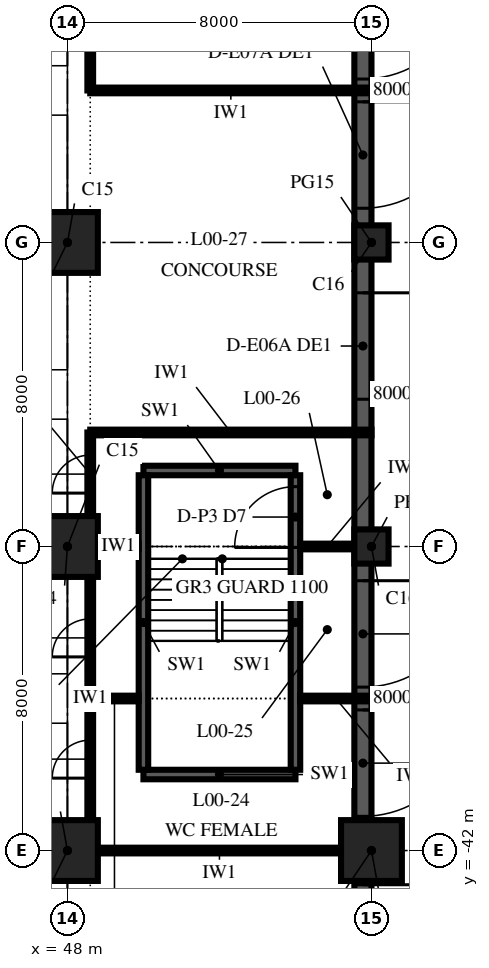
"""IFC4 building model, lengths in metres.
Left out: names, types, materials, properties, quantities, classifications, styles, units other than length and angle.
Written with IfcOpenShell. Run it as: python <this file> out.ifc"""

import sys

from ifc_helpers import new_model, si_unit, direction, frame, frame_2d, origin, origin_2d, place, context, subcontext, project, spatial, rectangle, extrude, element, fill, save


model = new_model("IFC4")
c1 = context("Model", 3, precision=1e-05, world=origin(), true_north=direction((0.0, 1.0)))
c2 = subcontext(c1, "Body", "Model", "MODEL_VIEW")
j1 = project(units=[si_unit("LENGTHUNIT", "METRE"), si_unit("PLANEANGLEUNIT", "RADIAN")], contexts=[c1])
p1 = place(None, origin())
s1 = spatial("IfcSite", under=j1, at=p1, CompositionType="ELEMENT")
p2 = place(p1, origin())
s2 = spatial("IfcBuilding", under=s1, at=p2, CompositionType="ELEMENT")
p3 = place(p2, origin())
s3 = spatial("IfcBuildingStorey", under=s2, at=p3, CompositionType="ELEMENT", Elevation=0.0)
for number, where, z_axis, x_axis in (
    (1, (48.0, -42.0, 0.0), (0.0, 0.0, 1.0), (1.0, 0.0, 0.0)),
    (2, (48.0, -34.0, 0.0), (0.0, 0.0, 1.0), (1.0, 0.0, 0.0)),
    (3, (48.0, -26.0, 0.0), (0.0, 0.0, 1.0), (1.0, 0.0, 0.0)),
    (4, (56.0, -42.0, 0.0), (0.0, 0.0, 1.0), (1.0, 0.0, 0.0)),
):
    element("IfcColumn", number, at=place(p3, frame(where, z_axis=z_axis, x_axis=x_axis)), inside=s3, PredefinedType="COLUMN", context=c2, shape_type="SweptSolid", body=[
        extrude(rectangle(XDim=1.6, YDim=1.6, at=origin_2d()), origin(), (0.0, 0.0, 1.0), 6.0),
    ])
for number, where, z_axis, x_axis in (
    (5, (56.0, -34.0, 0.0), (0.0, 0.0, 1.0), (1.0, 0.0, 0.0)),
    (6, (56.0, -26.0, 0.0), (0.0, 0.0, 1.0), (1.0, 0.0, 0.0)),
):
    element("IfcColumn", number, at=place(p3, frame(where, z_axis=z_axis, x_axis=x_axis)), inside=s3, PredefinedType="COLUMN", context=c2, shape_type="SweptSolid", body=[
        extrude(rectangle(XDim=0.9, YDim=0.9, at=origin_2d()), origin(), (0.0, 0.0, 1.0), 6.0),
    ])
p4 = place(p3, frame((55.775, -73.55, 0.0), z_axis=(0.0, 0.0, 1.0), x_axis=(0.0, 1.0, 0.0)))
e7 = element("IfcWall", 7, at=p4, inside=s3, PredefinedType="SOLIDWALL", context=c2, shape_type="SweptSolid", body=[
    extrude(rectangle(XDim=119.1, YDim=0.45, at=frame_2d((59.55, 0.0))), origin(), (0.0, 0.0, 1.0), 6.0),
])
p5 = place(p4, frame((0.675, 0.0, 0.0)))
e8 = element("IfcOpeningElement", 8, at=p5, cuts=e7, PredefinedType="OPENING", context=c2, shape_type="SweptSolid", body=[
    extrude(rectangle(XDim=2.8, YDim=2.4, at=frame_2d((1.4, 1.2))), frame((0.0, 0.24, 0.0), z_axis=(0.0, -1.0, 0.0), x_axis=(1.0, 0.0, 0.0)), (0.0, 0.0, 1.0), 0.48),
])
p6 = place(p4, frame((4.075, 0.0, 0.0)))
e9 = element("IfcOpeningElement", 9, at=p6, cuts=e7, PredefinedType="OPENING", context=c2, shape_type="SweptSolid", body=[
    extrude(rectangle(XDim=2.8, YDim=2.4, at=frame_2d((1.4, 1.2))), frame((0.0, 0.24, 0.0), z_axis=(0.0, -1.0, 0.0), x_axis=(1.0, 0.0, 0.0)), (0.0, 0.0, 1.0), 0.48),
])
p7 = place(p4, frame((8.45, 0.0, 0.0)))
e10 = element("IfcOpeningElement", 10, at=p7, cuts=e7, PredefinedType="OPENING", context=c2, shape_type="SweptSolid", body=[
    extrude(rectangle(XDim=2.8, YDim=2.4, at=frame_2d((1.4, 1.2))), frame((0.0, 0.24, 0.0), z_axis=(0.0, -1.0, 0.0), x_axis=(1.0, 0.0, 0.0)), (0.0, 0.0, 1.0), 0.48),
])
p8 = place(p4, frame((11.85, 0.0, 0.0)))
e11 = element("IfcOpeningElement", 11, at=p8, cuts=e7, PredefinedType="OPENING", context=c2, shape_type="SweptSolid", body=[
    extrude(rectangle(XDim=2.8, YDim=2.4, at=frame_2d((1.4, 1.2))), frame((0.0, 0.24, 0.0), z_axis=(0.0, -1.0, 0.0), x_axis=(1.0, 0.0, 0.0)), (0.0, 0.0, 1.0), 0.48),
])
p9 = place(p4, frame((16.45, 0.0, 0.0)))
e12 = element("IfcOpeningElement", 12, at=p9, cuts=e7, PredefinedType="OPENING", context=c2, shape_type="SweptSolid", body=[
    extrude(rectangle(XDim=2.8, YDim=2.4, at=frame_2d((1.4, 1.2))), frame((0.0, 0.24, 0.0), z_axis=(0.0, -1.0, 0.0), x_axis=(1.0, 0.0, 0.0)), (0.0, 0.0, 1.0), 0.48),
])
p10 = place(p4, frame((19.85, 0.0, 0.0)))
e13 = element("IfcOpeningElement", 13, at=p10, cuts=e7, PredefinedType="OPENING", context=c2, shape_type="SweptSolid", body=[
    extrude(rectangle(XDim=2.8, YDim=2.4, at=frame_2d((1.4, 1.2))), frame((0.0, 0.24, 0.0), z_axis=(0.0, -1.0, 0.0), x_axis=(1.0, 0.0, 0.0)), (0.0, 0.0, 1.0), 0.48),
])
p11 = place(p4, frame((24.45, 0.0, 0.0)))
e14 = element("IfcOpeningElement", 14, at=p11, cuts=e7, PredefinedType="OPENING", context=c2, shape_type="SweptSolid", body=[
    extrude(rectangle(XDim=2.8, YDim=2.4, at=frame_2d((1.4, 1.2))), frame((0.0, 0.24, 0.0), z_axis=(0.0, -1.0, 0.0), x_axis=(1.0, 0.0, 0.0)), (0.0, 0.0, 1.0), 0.48),
])
p12 = place(p4, frame((27.85, 0.0, 0.0)))
e15 = element("IfcOpeningElement", 15, at=p12, cuts=e7, PredefinedType="OPENING", context=c2, shape_type="SweptSolid", body=[
    extrude(rectangle(XDim=2.8, YDim=2.4, at=frame_2d((1.4, 1.2))), frame((0.0, 0.24, 0.0), z_axis=(0.0, -1.0, 0.0), x_axis=(1.0, 0.0, 0.0)), (0.0, 0.0, 1.0), 0.48),
])
p13 = place(p4, frame((32.45, 0.0, 0.0)))
e16 = element("IfcOpeningElement", 16, at=p13, cuts=e7, PredefinedType="OPENING", context=c2, shape_type="SweptSolid", body=[
    extrude(rectangle(XDim=2.8, YDim=2.4, at=frame_2d((1.4, 1.2))), frame((0.0, 0.24, 0.0), z_axis=(0.0, -1.0, 0.0), x_axis=(1.0, 0.0, 0.0)), (0.0, 0.0, 1.0), 0.48),
])
p14 = place(p4, frame((35.85, 0.0, 0.0)))
e17 = element("IfcOpeningElement", 17, at=p14, cuts=e7, PredefinedType="OPENING", context=c2, shape_type="SweptSolid", body=[
    extrude(rectangle(XDim=2.8, YDim=2.4, at=frame_2d((1.4, 1.2))), frame((0.0, 0.24, 0.0), z_axis=(0.0, -1.0, 0.0), x_axis=(1.0, 0.0, 0.0)), (0.0, 0.0, 1.0), 0.48),
])
p15 = place(p4, frame((43.425, 0.0, 0.0)))
e18 = element("IfcOpeningElement", 18, at=p15, cuts=e7, PredefinedType="OPENING", context=c2, shape_type="SweptSolid", body=[
    extrude(rectangle(XDim=2.8, YDim=2.4, at=frame_2d((1.4, 1.2))), frame((0.0, 0.24, 0.0), z_axis=(0.0, -1.0, 0.0), x_axis=(1.0, 0.0, 0.0)), (0.0, 0.0, 1.0), 0.48),
])
p16 = place(p4, frame((48.45, 0.0, 0.0)))
e19 = element("IfcOpeningElement", 19, at=p16, cuts=e7, PredefinedType="OPENING", context=c2, shape_type="SweptSolid", body=[
    extrude(rectangle(XDim=2.8, YDim=2.4, at=frame_2d((1.4, 1.2))), frame((0.0, 0.24, 0.0), z_axis=(0.0, -1.0, 0.0), x_axis=(1.0, 0.0, 0.0)), (0.0, 0.0, 1.0), 0.48),
])
p17 = place(p4, frame((51.85, 0.0, 0.0)))
e20 = element("IfcOpeningElement", 20, at=p17, cuts=e7, PredefinedType="OPENING", context=c2, shape_type="SweptSolid", body=[
    extrude(rectangle(XDim=2.8, YDim=2.4, at=frame_2d((1.4, 1.2))), frame((0.0, 0.24, 0.0), z_axis=(0.0, -1.0, 0.0), x_axis=(1.0, 0.0, 0.0)), (0.0, 0.0, 1.0), 0.48),
])
p18 = place(p4, frame((56.45, 0.0, 0.0)))
e21 = element("IfcOpeningElement", 21, at=p18, cuts=e7, PredefinedType="OPENING", context=c2, shape_type="SweptSolid", body=[
    extrude(rectangle(XDim=2.8, YDim=2.4, at=frame_2d((1.4, 1.2))), frame((0.0, 0.24, 0.0), z_axis=(0.0, -1.0, 0.0), x_axis=(1.0, 0.0, 0.0)), (0.0, 0.0, 1.0), 0.48),
])
p19 = place(p4, frame((59.85, 0.0, 0.0)))
e22 = element("IfcOpeningElement", 22, at=p19, cuts=e7, PredefinedType="OPENING", context=c2, shape_type="SweptSolid", body=[
    extrude(rectangle(XDim=2.8, YDim=2.4, at=frame_2d((1.4, 1.2))), frame((0.0, 0.24, 0.0), z_axis=(0.0, -1.0, 0.0), x_axis=(1.0, 0.0, 0.0)), (0.0, 0.0, 1.0), 0.48),
])
p20 = place(p4, frame((64.45, 0.0, 0.0)))
e23 = element("IfcOpeningElement", 23, at=p20, cuts=e7, PredefinedType="OPENING", context=c2, shape_type="SweptSolid", body=[
    extrude(rectangle(XDim=2.8, YDim=2.4, at=frame_2d((1.4, 1.2))), frame((0.0, 0.24, 0.0), z_axis=(0.0, -1.0, 0.0), x_axis=(1.0, 0.0, 0.0)), (0.0, 0.0, 1.0), 0.48),
])
p21 = place(p4, frame((67.85, 0.0, 0.0)))
e24 = element("IfcOpeningElement", 24, at=p21, cuts=e7, PredefinedType="OPENING", context=c2, shape_type="SweptSolid", body=[
    extrude(rectangle(XDim=2.8, YDim=2.4, at=frame_2d((1.4, 1.2))), frame((0.0, 0.24, 0.0), z_axis=(0.0, -1.0, 0.0), x_axis=(1.0, 0.0, 0.0)), (0.0, 0.0, 1.0), 0.48),
])
p22 = place(p4, frame((72.45, 0.0, 0.0)))
e25 = element("IfcOpeningElement", 25, at=p22, cuts=e7, PredefinedType="OPENING", context=c2, shape_type="SweptSolid", body=[
    extrude(rectangle(XDim=2.8, YDim=2.4, at=frame_2d((1.4, 1.2))), frame((0.0, 0.24, 0.0), z_axis=(0.0, -1.0, 0.0), x_axis=(1.0, 0.0, 0.0)), (0.0, 0.0, 1.0), 0.48),
])
p23 = place(p4, frame((75.85, 0.0, 0.0)))
e26 = element("IfcOpeningElement", 26, at=p23, cuts=e7, PredefinedType="OPENING", context=c2, shape_type="SweptSolid", body=[
    extrude(rectangle(XDim=2.8, YDim=2.4, at=frame_2d((1.4, 1.2))), frame((0.0, 0.24, 0.0), z_axis=(0.0, -1.0, 0.0), x_axis=(1.0, 0.0, 0.0)), (0.0, 0.0, 1.0), 0.48),
])
p24 = place(p4, frame((80.45, 0.0, 0.0)))
e27 = element("IfcOpeningElement", 27, at=p24, cuts=e7, PredefinedType="OPENING", context=c2, shape_type="SweptSolid", body=[
    extrude(rectangle(XDim=2.8, YDim=2.4, at=frame_2d((1.4, 1.2))), frame((0.0, 0.24, 0.0), z_axis=(0.0, -1.0, 0.0), x_axis=(1.0, 0.0, 0.0)), (0.0, 0.0, 1.0), 0.48),
])
p25 = place(p4, frame((83.85, 0.0, 0.0)))
e28 = element("IfcOpeningElement", 28, at=p25, cuts=e7, PredefinedType="OPENING", context=c2, shape_type="SweptSolid", body=[
    extrude(rectangle(XDim=2.8, YDim=2.4, at=frame_2d((1.4, 1.2))), frame((0.0, 0.24, 0.0), z_axis=(0.0, -1.0, 0.0), x_axis=(1.0, 0.0, 0.0)), (0.0, 0.0, 1.0), 0.48),
])
p26 = place(p4, frame((88.45, 0.0, 0.0)))
e29 = element("IfcOpeningElement", 29, at=p26, cuts=e7, PredefinedType="OPENING", context=c2, shape_type="SweptSolid", body=[
    extrude(rectangle(XDim=2.8, YDim=2.4, at=frame_2d((1.4, 1.2))), frame((0.0, 0.24, 0.0), z_axis=(0.0, -1.0, 0.0), x_axis=(1.0, 0.0, 0.0)), (0.0, 0.0, 1.0), 0.48),
])
p27 = place(p4, frame((91.85, 0.0, 0.0)))
e30 = element("IfcOpeningElement", 30, at=p27, cuts=e7, PredefinedType="OPENING", context=c2, shape_type="SweptSolid", body=[
    extrude(rectangle(XDim=2.8, YDim=2.4, at=frame_2d((1.4, 1.2))), frame((0.0, 0.24, 0.0), z_axis=(0.0, -1.0, 0.0), x_axis=(1.0, 0.0, 0.0)), (0.0, 0.0, 1.0), 0.48),
])
p28 = place(p4, frame((96.45, 0.0, 0.0)))
e31 = element("IfcOpeningElement", 31, at=p28, cuts=e7, PredefinedType="OPENING", context=c2, shape_type="SweptSolid", body=[
    extrude(rectangle(XDim=2.8, YDim=2.4, at=frame_2d((1.4, 1.2))), frame((0.0, 0.24, 0.0), z_axis=(0.0, -1.0, 0.0), x_axis=(1.0, 0.0, 0.0)), (0.0, 0.0, 1.0), 0.48),
])
p29 = place(p4, frame((99.85, 0.0, 0.0)))
e32 = element("IfcOpeningElement", 32, at=p29, cuts=e7, PredefinedType="OPENING", context=c2, shape_type="SweptSolid", body=[
    extrude(rectangle(XDim=2.8, YDim=2.4, at=frame_2d((1.4, 1.2))), frame((0.0, 0.24, 0.0), z_axis=(0.0, -1.0, 0.0), x_axis=(1.0, 0.0, 0.0)), (0.0, 0.0, 1.0), 0.48),
])
p30 = place(p4, frame((104.45, 0.0, 0.0)))
e33 = element("IfcOpeningElement", 33, at=p30, cuts=e7, PredefinedType="OPENING", context=c2, shape_type="SweptSolid", body=[
    extrude(rectangle(XDim=2.8, YDim=2.4, at=frame_2d((1.4, 1.2))), frame((0.0, 0.24, 0.0), z_axis=(0.0, -1.0, 0.0), x_axis=(1.0, 0.0, 0.0)), (0.0, 0.0, 1.0), 0.48),
])
p31 = place(p4, frame((107.85, 0.0, 0.0)))
e34 = element("IfcOpeningElement", 34, at=p31, cuts=e7, PredefinedType="OPENING", context=c2, shape_type="SweptSolid", body=[
    extrude(rectangle(XDim=2.8, YDim=2.4, at=frame_2d((1.4, 1.2))), frame((0.0, 0.24, 0.0), z_axis=(0.0, -1.0, 0.0), x_axis=(1.0, 0.0, 0.0)), (0.0, 0.0, 1.0), 0.48),
])
p32 = place(p4, frame((112.225, 0.0, 0.0)))
e35 = element("IfcOpeningElement", 35, at=p32, cuts=e7, PredefinedType="OPENING", context=c2, shape_type="SweptSolid", body=[
    extrude(rectangle(XDim=2.8, YDim=2.4, at=frame_2d((1.4, 1.2))), frame((0.0, 0.24, 0.0), z_axis=(0.0, -1.0, 0.0), x_axis=(1.0, 0.0, 0.0)), (0.0, 0.0, 1.0), 0.48),
])
p33 = place(p4, frame((115.625, 0.0, 0.0)))
e36 = element("IfcOpeningElement", 36, at=p33, cuts=e7, PredefinedType="OPENING", context=c2, shape_type="SweptSolid", body=[
    extrude(rectangle(XDim=2.8, YDim=2.4, at=frame_2d((1.4, 1.2))), frame((0.0, 0.24, 0.0), z_axis=(0.0, -1.0, 0.0), x_axis=(1.0, 0.0, 0.0)), (0.0, 0.0, 1.0), 0.48),
])
for number, where, z_axis, x_axis in (
    (37, (50.0, -40.0, 0.0), (0.0, 0.0, 1.0), (1.0, 0.0, 0.0)),
    (38, (54.0, -32.0, 0.0), (0.0, 0.0, 1.0), (-1.0, 0.0, 0.0)),
):
    element("IfcWall", number, at=place(p3, frame(where, z_axis=z_axis, x_axis=x_axis)), inside=s3, PredefinedType="SOLIDWALL", context=c2, shape_type="SweptSolid", body=[
        extrude(rectangle(XDim=4.0, YDim=0.25, at=frame_2d((2.0, 0.0))), origin(), (0.0, 0.0, 1.0), 6.0),
    ])
p34 = place(p3, frame((54.0, -39.875, 0.0), z_axis=(0.0, 0.0, 1.0), x_axis=(0.0, 1.0, 0.0)))
e39 = element("IfcWall", 39, at=p34, inside=s3, PredefinedType="SOLIDWALL", context=c2, shape_type="SweptSolid", body=[
    extrude(rectangle(XDim=7.75, YDim=0.25, at=frame_2d((3.875, 0.0))), origin(), (0.0, 0.0, 1.0), 6.0),
])
p35 = place(p34, frame((5.85, 0.0, 0.0)))
e40 = element("IfcOpeningElement", 40, at=p35, cuts=e39, PredefinedType="OPENING", context=c2, shape_type="SweptSolid", body=[
    extrude(rectangle(XDim=1.6, YDim=2.1, at=frame_2d((0.8, 1.05))), frame((0.0, 0.14, 0.0), z_axis=(0.0, -1.0, 0.0), x_axis=(1.0, 0.0, 0.0)), (0.0, 0.0, 1.0), 0.28),
])
p36 = place(p3, frame((50.0, -32.125, 0.0), z_axis=(0.0, 0.0, 1.0), x_axis=(0.0, -1.0, 0.0)))
e41 = element("IfcWall", 41, at=p36, inside=s3, PredefinedType="SOLIDWALL", context=c2, shape_type="SweptSolid", body=[
    extrude(rectangle(XDim=7.75, YDim=0.25, at=frame_2d((3.875, 0.0))), origin(), (0.0, 0.0, 1.0), 6.0),
])
p37 = place(p3, frame((48.6, -41.19, 0.0), z_axis=(0.0, 0.0, 1.0), x_axis=(0.0, 1.0, 0.0)))
e42 = element("IfcWall", 42, at=p37, inside=s3, PredefinedType="PARTITIONING", context=c2, shape_type="SweptSolid", body=[
    extrude(rectangle(XDim=6.38, YDim=0.15, at=frame_2d((3.19, 0.0))), origin(), (0.0, 0.0, 1.0), 4.1),
])
p38 = place(p37, frame((1.095, 0.0, 0.0)))
e43 = element("IfcOpeningElement", 43, at=p38, cuts=e42, PredefinedType="OPENING", context=c2, shape_type="SweptSolid", body=[
    extrude(rectangle(XDim=1.0, YDim=2.1, at=frame_2d((0.5, 1.05))), frame((0.0, 0.09, 0.0), z_axis=(0.0, -1.0, 0.0), x_axis=(1.0, 0.0, 0.0)), (0.0, 0.0, 1.0), 0.18),
])
p39 = place(p37, frame((4.285, 0.0, 0.0)))
e44 = element("IfcOpeningElement", 44, at=p39, cuts=e42, PredefinedType="OPENING", context=c2, shape_type="SweptSolid", body=[
    extrude(rectangle(XDim=1.0, YDim=2.1, at=frame_2d((0.5, 1.05))), frame((0.0, 0.09, 0.0), z_axis=(0.0, -1.0, 0.0), x_axis=(1.0, 0.0, 0.0)), (0.0, 0.0, 1.0), 0.18),
])
p40 = place(p3, frame((48.6, -33.19, 0.0), z_axis=(0.0, 0.0, 1.0), x_axis=(0.0, 1.0, 0.0)))
e45 = element("IfcWall", 45, at=p40, inside=s3, PredefinedType="PARTITIONING", context=c2, shape_type="SweptSolid", body=[
    extrude(rectangle(XDim=2.19, YDim=0.15, at=frame_2d((1.095, 0.0))), origin(), (0.0, 0.0, 1.0), 5.05),
])
p41 = place(p40, frame((0.595, 0.0, 0.0)))
e46 = element("IfcOpeningElement", 46, at=p41, cuts=e45, PredefinedType="OPENING", context=c2, shape_type="SweptSolid", body=[
    extrude(rectangle(XDim=1.0, YDim=2.1, at=frame_2d((0.5, 1.05))), frame((0.0, 0.09, 0.0), z_axis=(0.0, -1.0, 0.0), x_axis=(1.0, 0.0, 0.0)), (0.0, 0.0, 1.0), 0.18),
])
p42 = place(p3, frame((48.6, -22.0, 0.0), z_axis=(0.0, 0.0, 1.0), x_axis=(0.0, 1.0, 0.0)))
e47 = element("IfcWall", 47, at=p42, inside=s3, PredefinedType="PARTITIONING", context=c2, shape_type="SweptSolid", body=[
    extrude(rectangle(XDim=3.715, YDim=0.15, at=frame_2d((1.857, 0.0))), origin(), (0.0, 0.0, 1.0), 5.7),
])
p43 = place(p42, frame((1.357, 0.0, 0.0)))
e48 = element("IfcOpeningElement", 48, at=p43, cuts=e47, PredefinedType="OPENING", context=c2, shape_type="SweptSolid", body=[
    extrude(rectangle(XDim=1.0, YDim=2.1, at=frame_2d((0.5, 1.05))), frame((0.0, 0.09, 0.0), z_axis=(0.0, -1.0, 0.0), x_axis=(1.0, 0.0, 0.0)), (0.0, 0.0, 1.0), 0.18),
])
p44 = place(p3, frame((48.81, -42.0, 0.0), z_axis=(0.0, 0.0, 1.0), x_axis=(1.0, 0.0, 0.0)))
e49 = element("IfcWall", 49, at=p44, inside=s3, PredefinedType="PARTITIONING", context=c2, shape_type="SweptSolid", body=[
    extrude(rectangle(XDim=6.38, YDim=0.15, at=frame_2d((3.19, 0.0))), origin(), (0.0, 0.0, 1.0), 4.1),
])
p45 = place(p3, frame((48.6, -38.0, 0.0), z_axis=(0.0, 0.0, 1.0), x_axis=(1.0, 0.0, 0.0)))
e50 = element("IfcWall", 50, at=p45, inside=s3, PredefinedType="PARTITIONING", context=c2, shape_type="SweptSolid", body=[
    extrude(rectangle(XDim=1.275, YDim=0.15, at=frame_2d((0.637, 0.0))), origin(), (0.0, 0.0, 1.0), 5.7),
])
p46 = place(p3, frame((54.125, -38.0, 0.0), z_axis=(0.0, 0.0, 1.0), x_axis=(1.0, 0.0, 0.0)))
e51 = element("IfcWall", 51, at=p46, inside=s3, PredefinedType="PARTITIONING", context=c2, shape_type="SweptSolid", body=[
    extrude(rectangle(XDim=1.875, YDim=0.15, at=frame_2d((0.938, 0.0))), origin(), (0.0, 0.0, 1.0), 5.7),
])
p47 = place(p3, frame((48.81, -34.0, 0.0), z_axis=(0.0, 0.0, 1.0), x_axis=(1.0, 0.0, 0.0)))
e52 = element("IfcWall", 52, at=p47, inside=s3, PredefinedType="PARTITIONING", context=c2, shape_type="SweptSolid", body=[
    extrude(rectangle(XDim=1.065, YDim=0.15, at=frame_2d((0.532, 0.0))), origin(), (0.0, 0.0, 1.0), 5.7),
])
p48 = place(p3, frame((54.125, -34.0, 0.0), z_axis=(0.0, 0.0, 1.0), x_axis=(1.0, 0.0, 0.0)))
e53 = element("IfcWall", 53, at=p48, inside=s3, PredefinedType="PARTITIONING", context=c2, shape_type="SweptSolid", body=[
    extrude(rectangle(XDim=1.415, YDim=0.15, at=frame_2d((0.708, 0.0))), origin(), (0.0, 0.0, 1.0), 5.7),
])
for number, where, z_axis, x_axis in (
    (54, (48.6, -31.0, 0.0), (0.0, 0.0, 1.0), (1.0, 0.0, 0.0)),
    (55, (48.6, -22.0, 0.0), (0.0, 0.0, 1.0), (1.0, 0.0, 0.0)),
):
    element("IfcWall", number, at=place(p3, frame(where, z_axis=z_axis, x_axis=x_axis)), inside=s3, PredefinedType="PARTITIONING", context=c2, shape_type="SweptSolid", body=[
        extrude(rectangle(XDim=7.4, YDim=0.15, at=frame_2d((3.7, 0.0))), origin(), (0.0, 0.0, 1.0), 5.7),
    ])
p49 = place(p12, frame((2.8, 0.0, 0.0), z_axis=(0.0, 0.0, 1.0), x_axis=(-1.0, 0.0, 0.0)))
e56 = element("IfcDoor", 56, at=p49, inside=s3, OperationType="DOUBLE_DOOR_SINGLE_SWING", PredefinedType="DOOR", context=c2, shape_type="SweptSolid", body=[
    extrude(rectangle(XDim=2.8, YDim=2.4, at=frame_2d((1.4, 1.2))), frame((0.0, 0.225, 0.0), z_axis=(0.0, -1.0, 0.0), x_axis=(1.0, 0.0, 0.0)), (0.0, 0.0, 1.0), 0.449),
])
fill(e15, e56)
p50 = place(p13, frame((2.8, 0.0, 0.0), z_axis=(0.0, 0.0, 1.0), x_axis=(-1.0, 0.0, 0.0)))
e57 = element("IfcDoor", 57, at=p50, inside=s3, OperationType="DOUBLE_DOOR_SINGLE_SWING", PredefinedType="DOOR", context=c2, shape_type="SweptSolid", body=[
    extrude(rectangle(XDim=2.8, YDim=2.4, at=frame_2d((1.4, 1.2))), frame((0.0, 0.225, 0.0), z_axis=(0.0, -1.0, 0.0), x_axis=(1.0, 0.0, 0.0)), (0.0, 0.0, 1.0), 0.449),
])
fill(e16, e57)
p51 = place(p14, frame((2.8, 0.0, 0.0), z_axis=(0.0, 0.0, 1.0), x_axis=(-1.0, 0.0, 0.0)))
e58 = element("IfcDoor", 58, at=p51, inside=s3, OperationType="DOUBLE_DOOR_SINGLE_SWING", PredefinedType="DOOR", context=c2, shape_type="SweptSolid", body=[
    extrude(rectangle(XDim=2.8, YDim=2.4, at=frame_2d((1.4, 1.2))), frame((0.0, 0.225, 0.0), z_axis=(0.0, -1.0, 0.0), x_axis=(1.0, 0.0, 0.0)), (0.0, 0.0, 1.0), 0.449),
])
fill(e17, e58)
p52 = place(p15, frame((2.8, 0.0, 0.0), z_axis=(0.0, 0.0, 1.0), x_axis=(-1.0, 0.0, 0.0)))
e59 = element("IfcDoor", 59, at=p52, inside=s3, OperationType="DOUBLE_DOOR_SINGLE_SWING", PredefinedType="DOOR", context=c2, shape_type="SweptSolid", body=[
    extrude(rectangle(XDim=2.8, YDim=2.4, at=frame_2d((1.4, 1.2))), frame((0.0, 0.225, 0.0), z_axis=(0.0, -1.0, 0.0), x_axis=(1.0, 0.0, 0.0)), (0.0, 0.0, 1.0), 0.449),
])
fill(e18, e59)
p53 = place(p16, frame((2.8, 0.0, 0.0), z_axis=(0.0, 0.0, 1.0), x_axis=(-1.0, 0.0, 0.0)))
e60 = element("IfcDoor", 60, at=p53, inside=s3, OperationType="DOUBLE_DOOR_SINGLE_SWING", PredefinedType="DOOR", context=c2, shape_type="SweptSolid", body=[
    extrude(rectangle(XDim=2.8, YDim=2.4, at=frame_2d((1.4, 1.2))), frame((0.0, 0.225, 0.0), z_axis=(0.0, -1.0, 0.0), x_axis=(1.0, 0.0, 0.0)), (0.0, 0.0, 1.0), 0.449),
])
fill(e19, e60)
p54 = place(p17, frame((2.8, 0.0, 0.0), z_axis=(0.0, 0.0, 1.0), x_axis=(-1.0, 0.0, 0.0)))
e61 = element("IfcDoor", 61, at=p54, inside=s3, OperationType="DOUBLE_DOOR_SINGLE_SWING", PredefinedType="DOOR", context=c2, shape_type="SweptSolid", body=[
    extrude(rectangle(XDim=2.8, YDim=2.4, at=frame_2d((1.4, 1.2))), frame((0.0, 0.225, 0.0), z_axis=(0.0, -1.0, 0.0), x_axis=(1.0, 0.0, 0.0)), (0.0, 0.0, 1.0), 0.449),
])
fill(e20, e61)
p55 = place(p35, origin())
e62 = element("IfcDoor", 62, at=p55, inside=s3, OperationType="DOUBLE_DOOR_SINGLE_SWING", PredefinedType="DOOR", context=c2, shape_type="SweptSolid", body=[
    extrude(rectangle(XDim=1.6, YDim=2.1, at=frame_2d((0.8, 1.05))), frame((0.0, 0.125, 0.0), z_axis=(0.0, -1.0, 0.0), x_axis=(1.0, 0.0, 0.0)), (0.0, 0.0, 1.0), 0.25),
])
fill(e40, e62)
p56 = place(p38, origin())
e63 = element("IfcDoor", 63, at=p56, inside=s3, OperationType="SINGLE_SWING_LEFT", PredefinedType="DOOR", context=c2, shape_type="SweptSolid", body=[
    extrude(rectangle(XDim=1.0, YDim=2.1, at=frame_2d((0.5, 1.05))), frame((0.0, 0.075, 0.0), z_axis=(0.0, -1.0, 0.0), x_axis=(1.0, 0.0, 0.0)), (0.0, 0.0, 1.0), 0.149),
])
fill(e43, e63)
p57 = place(p39, origin())
e64 = element("IfcDoor", 64, at=p57, inside=s3, OperationType="SINGLE_SWING_LEFT", PredefinedType="DOOR", context=c2, shape_type="SweptSolid", body=[
    extrude(rectangle(XDim=1.0, YDim=2.1, at=frame_2d((0.5, 1.05))), frame((0.0, 0.075, 0.0), z_axis=(0.0, -1.0, 0.0), x_axis=(1.0, 0.0, 0.0)), (0.0, 0.0, 1.0), 0.149),
])
fill(e44, e64)
p58 = place(p41, origin())
e65 = element("IfcDoor", 65, at=p58, inside=s3, OperationType="SINGLE_SWING_LEFT", PredefinedType="DOOR", context=c2, shape_type="SweptSolid", body=[
    extrude(rectangle(XDim=1.0, YDim=2.1, at=frame_2d((0.5, 1.05))), frame((0.0, 0.075, 0.0), z_axis=(0.0, -1.0, 0.0), x_axis=(1.0, 0.0, 0.0)), (0.0, 0.0, 1.0), 0.149),
])
fill(e46, e65)
save(model, sys.argv[1])
